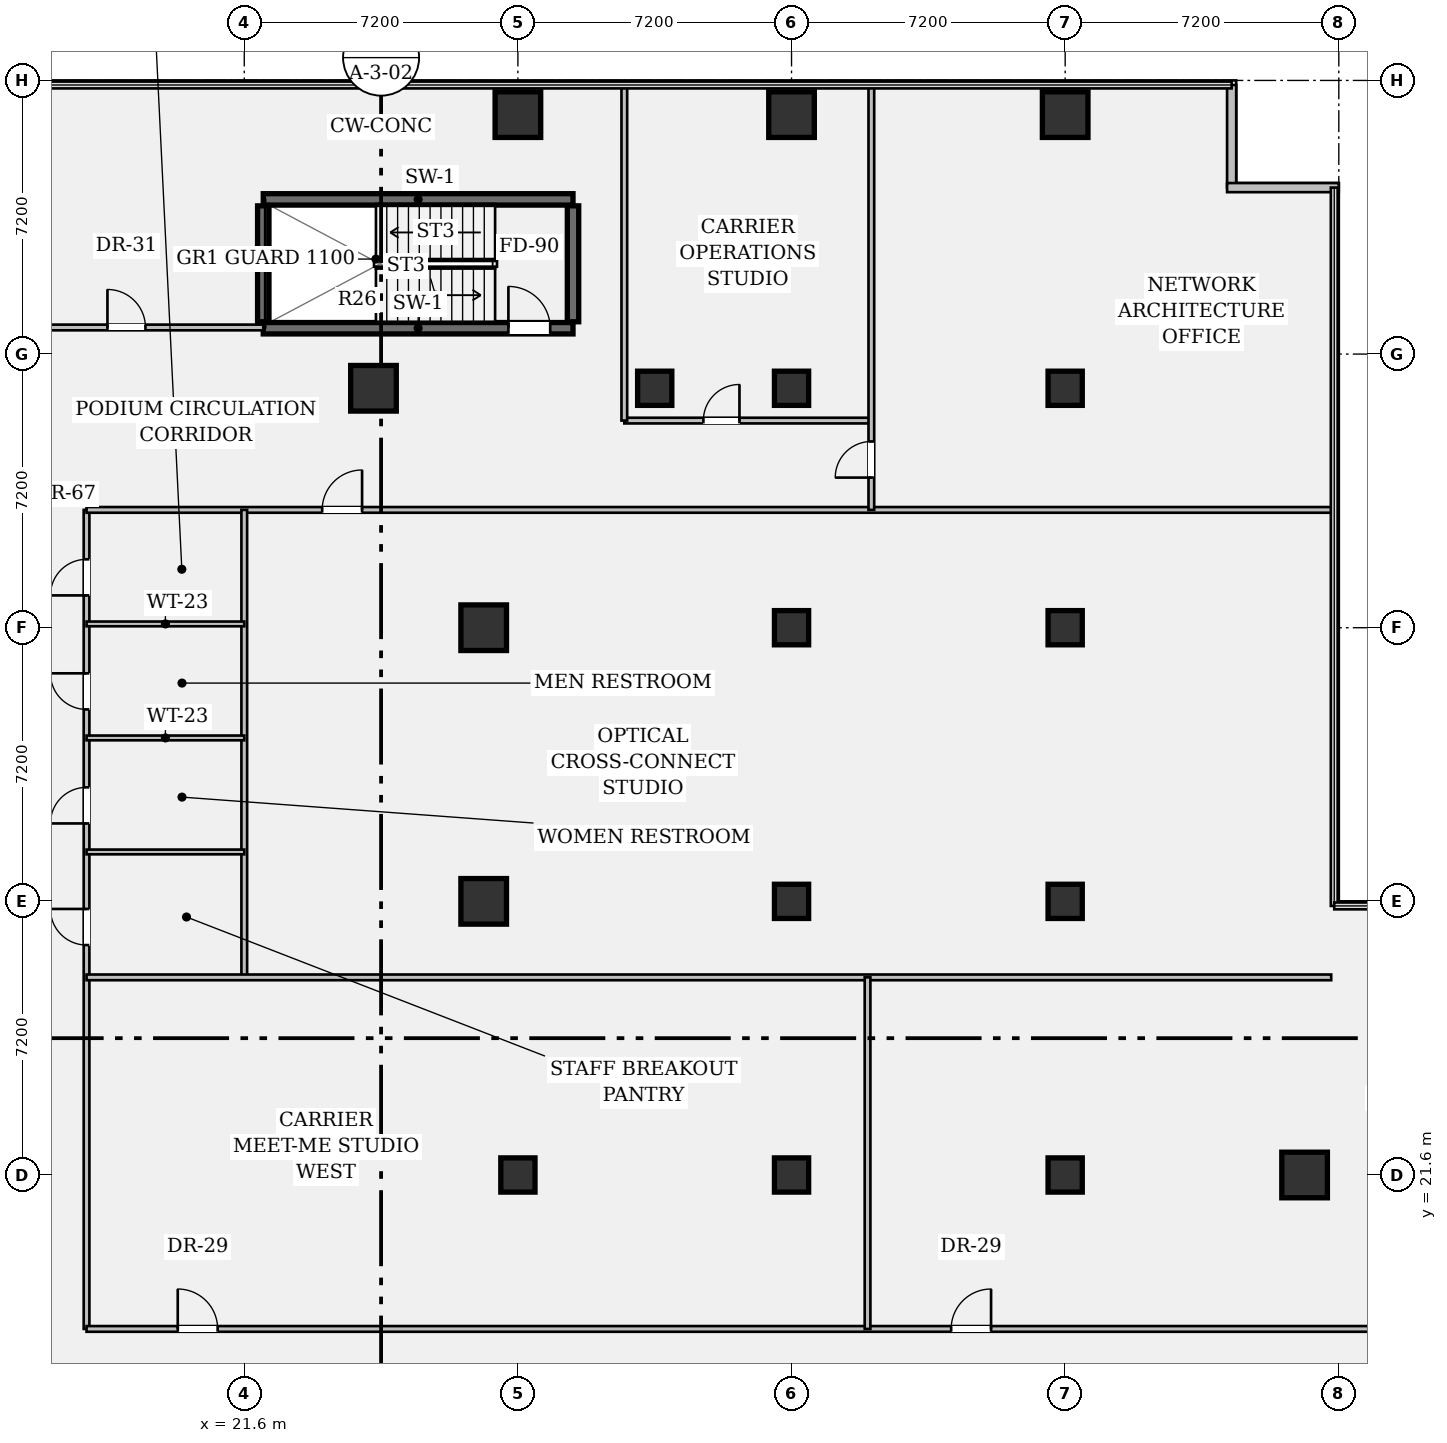
"""IFC4 building model, lengths in metres.
Left out: names, types, materials, properties, quantities, classifications, styles, units other than length and angle.
Written with IfcOpenShell. Run it as: python <this file> out.ifc"""

import sys

from ifc_helpers import new_model, si_unit, direction, frame, frame_2d, origin, origin_2d, place, context, subcontext, project, spatial, rectangle, hollow_rectangle, extrude, element, fill, save


model = new_model("IFC4")
c1 = context("Model", 3, precision=1e-05, world=origin(), true_north=direction((0.0, 1.0)))
c2 = subcontext(c1, "Body", "Model", "MODEL_VIEW")
j1 = project(units=[si_unit("LENGTHUNIT", "METRE"), si_unit("PLANEANGLEUNIT", "RADIAN")], contexts=[c1])
p1 = place(None, origin())
s1 = spatial("IfcSite", under=j1, at=p1, CompositionType="ELEMENT")
p2 = place(p1, origin())
s2 = spatial("IfcBuilding", under=s1, at=p2, CompositionType="ELEMENT")
p3 = place(p2, frame((0.0, 0.0, 5.25)))
s3 = spatial("IfcBuildingStorey", under=s2, at=p3, CompositionType="ELEMENT", Elevation=5.25)
p4 = place(p3, frame((22.1, 43.88, 0.0), z_axis=(0.0, 0.0, 1.0), x_axis=(1.0, 0.0, 0.0)))
e1 = element("IfcWall", 1, at=p4, inside=s3, PredefinedType="SHEAR", context=c2, shape_type="SweptSolid", body=[
    extrude(rectangle(XDim=8.15, YDim=0.3, at=frame_2d((4.075, 0.0))), origin(), (0.0, 0.0, 1.0), 3.9),
])
p5 = place(p4, frame((6.45, 0.0, 0.0)))
e2 = element("IfcOpeningElement", 2, at=p5, cuts=e1, PredefinedType="OPENING", context=c2, shape_type="SweptSolid", body=[
    extrude(rectangle(XDim=1.1, YDim=2.15, at=frame_2d((0.55, 1.075))), frame((0.0, 0.162, 0.0), z_axis=(0.0, -1.0, 0.0), x_axis=(1.0, 0.0, 0.0)), (0.0, 0.0, 1.0), 0.324),
])
p6 = place(p3, frame((22.1, 47.27, 0.0), z_axis=(0.0, 0.0, 1.0), x_axis=(1.0, 0.0, 0.0)))
e3 = element("IfcWall", 3, at=p6, inside=s3, PredefinedType="SHEAR", context=c2, shape_type="SweptSolid", body=[
    extrude(rectangle(XDim=8.15, YDim=0.3, at=frame_2d((4.075, 0.0))), origin(), (0.0, 0.0, 1.0), 3.9),
])
for number, where, z_axis, x_axis in (
    (4, (22.1, 44.05, 0.0), (0.0, 0.0, 1.0), (0.0, 1.0, 0.0)),
    (5, (30.25, 44.05, 0.0), (0.0, 0.0, 1.0), (0.0, 1.0, 0.0)),
):
    element("IfcWall", number, at=place(p3, frame(where, z_axis=z_axis, x_axis=x_axis)), inside=s3, PredefinedType="SHEAR", context=c2, shape_type="SweptSolid", body=[
        extrude(rectangle(XDim=3.05, YDim=0.3, at=frame_2d((1.525, 0.0))), origin(), (0.0, 0.0, 1.0), 3.9),
    ])
for number, where, z_axis, x_axis in (
    (6, (25.0, 42.3, 0.0), (0.0, 0.0, 1.0), (1.0, 0.0, 0.0)),
    (7, (27.9, 28.8, 0.0), (0.0, 0.0, 1.0), (1.0, 0.0, 0.0)),
    (8, (27.9, 36.0, 0.0), (0.0, 0.0, 1.0), (1.0, 0.0, 0.0)),
):
    element("IfcColumn", number, at=place(p3, frame(where, z_axis=z_axis, x_axis=x_axis)), inside=s3, PredefinedType="COLUMN", context=c2, shape_type="SweptSolid", body=[
        extrude(hollow_rectangle(XDim=1.2, YDim=1.2, WallThickness=0.075, at=origin_2d()), origin(), (0.0, 0.0, 1.0), 3.9),
    ])
p7 = place(p3, frame((28.8, 21.6, 0.0), z_axis=(0.0, 0.0, 1.0), x_axis=(1.0, 0.0, 0.0)))
e9 = element("IfcColumn", 9, at=p7, inside=s3, PredefinedType="COLUMN", context=c2, shape_type="SweptSolid", body=[
    extrude(rectangle(XDim=0.9, YDim=0.9, at=origin_2d()), origin(), (0.0, 0.0, 1.0), 3.9),
])
p8 = place(p3, frame((28.8, 49.5, 0.0), z_axis=(0.0, 0.0, 1.0), x_axis=(1.0, 0.0, 0.0)))
e10 = element("IfcColumn", 10, at=p8, inside=s3, PredefinedType="COLUMN", context=c2, shape_type="SweptSolid", body=[
    extrude(hollow_rectangle(XDim=1.2, YDim=1.2, WallThickness=0.075, at=origin_2d()), origin(), (0.0, 0.0, 1.0), 3.9),
])
for number, where, z_axis, x_axis in (
    (11, (32.4, 42.3, 0.0), (0.0, 0.0, 1.0), (1.0, 0.0, 0.0)),
    (12, (36.0, 21.6, 0.0), (0.0, 0.0, 1.0), (1.0, 0.0, 0.0)),
    (13, (36.0, 28.8, 0.0), (0.0, 0.0, 1.0), (1.0, 0.0, 0.0)),
    (14, (36.0, 36.0, 0.0), (0.0, 0.0, 1.0), (1.0, 0.0, 0.0)),
    (15, (36.0, 42.3, 0.0), (0.0, 0.0, 1.0), (1.0, 0.0, 0.0)),
):
    element("IfcColumn", number, at=place(p3, frame(where, z_axis=z_axis, x_axis=x_axis)), inside=s3, PredefinedType="COLUMN", context=c2, shape_type="SweptSolid", body=[
        extrude(rectangle(XDim=0.9, YDim=0.9, at=origin_2d()), origin(), (0.0, 0.0, 1.0), 3.9),
    ])
p9 = place(p3, frame((36.0, 49.5, 0.0), z_axis=(0.0, 0.0, 1.0), x_axis=(1.0, 0.0, 0.0)))
e16 = element("IfcColumn", 16, at=p9, inside=s3, PredefinedType="COLUMN", context=c2, shape_type="SweptSolid", body=[
    extrude(hollow_rectangle(XDim=1.2, YDim=1.2, WallThickness=0.075, at=origin_2d()), origin(), (0.0, 0.0, 1.0), 3.9),
])
for number, where, z_axis, x_axis in (
    (17, (43.2, 21.6, 0.0), (0.0, 0.0, 1.0), (1.0, 0.0, 0.0)),
    (18, (43.2, 28.8, 0.0), (0.0, 0.0, 1.0), (1.0, 0.0, 0.0)),
    (19, (43.2, 36.0, 0.0), (0.0, 0.0, 1.0), (1.0, 0.0, 0.0)),
    (20, (43.2, 42.3, 0.0), (0.0, 0.0, 1.0), (1.0, 0.0, 0.0)),
):
    element("IfcColumn", number, at=place(p3, frame(where, z_axis=z_axis, x_axis=x_axis)), inside=s3, PredefinedType="COLUMN", context=c2, shape_type="SweptSolid", body=[
        extrude(rectangle(XDim=0.9, YDim=0.9, at=origin_2d()), origin(), (0.0, 0.0, 1.0), 3.9),
    ])
for number, where, z_axis, x_axis in (
    (21, (43.2, 49.5, 0.0), (0.0, 0.0, 1.0), (1.0, 0.0, 0.0)),
    (22, (49.5, 21.6, 0.0), (0.0, 0.0, 1.0), (1.0, 0.0, 0.0)),
):
    element("IfcColumn", number, at=place(p3, frame(where, z_axis=z_axis, x_axis=x_axis)), inside=s3, PredefinedType="COLUMN", context=c2, shape_type="SweptSolid", body=[
        extrude(hollow_rectangle(XDim=1.2, YDim=1.2, WallThickness=0.075, at=origin_2d()), origin(), (0.0, 0.0, 1.0), 3.9),
    ])
p10 = place(p3, frame((47.58, 50.28, 0.0), z_axis=(0.0, 0.0, 1.0), x_axis=(0.0, -1.0, 0.0)))
e23 = element("IfcWall", 23, at=p10, inside=s3, PredefinedType="STANDARD", context=c2, shape_type="SweptSolid", body=[
    extrude(rectangle(XDim=2.7, YDim=0.24, at=frame_2d((1.35, 0.0))), origin(), (0.0, 0.0, 1.0), 3.9),
])
p11 = place(p3, frame((47.46, 47.58, 0.0), z_axis=(0.0, 0.0, 1.0), x_axis=(1.0, 0.0, 0.0)))
e24 = element("IfcWall", 24, at=p11, inside=s3, PredefinedType="STANDARD", context=c2, shape_type="SweptSolid", body=[
    extrude(rectangle(XDim=2.94, YDim=0.24, at=frame_2d((1.47, 0.0))), origin(), (0.0, 0.0, 1.0), 3.9),
])
p12 = place(p3, frame((17.45, 17.55, 0.0), z_axis=(0.0, 0.0, 1.0), x_axis=(0.0, 1.0, 0.0)))
e25 = element("IfcWall", 25, at=p12, inside=s3, PredefinedType="PARTITIONING", context=c2, shape_type="SweptSolid", body=[
    extrude(rectangle(XDim=21.55, YDim=0.15, at=frame_2d((10.775, 0.0))), origin(), (0.0, 0.0, 1.0), 2.938),
])
p13 = place(p12, frame((19.3, 0.0, 0.0)))
e26 = element("IfcOpeningElement", 26, at=p13, cuts=e25, PredefinedType="OPENING", context=c2, shape_type="SweptSolid", body=[
    extrude(rectangle(XDim=0.95, YDim=2.15, at=frame_2d((0.475, 1.075))), frame((0.0, 0.087, 0.0), z_axis=(0.0, -1.0, 0.0), x_axis=(1.0, 0.0, 0.0)), (0.0, 0.0, 1.0), 0.174),
])
p14 = place(p12, frame((16.3, 0.0, 0.0)))
e27 = element("IfcOpeningElement", 27, at=p14, cuts=e25, PredefinedType="OPENING", context=c2, shape_type="SweptSolid", body=[
    extrude(rectangle(XDim=0.95, YDim=2.15, at=frame_2d((0.475, 1.075))), frame((0.0, 0.087, 0.0), z_axis=(0.0, -1.0, 0.0), x_axis=(1.0, 0.0, 0.0)), (0.0, 0.0, 1.0), 0.174),
])
p15 = place(p12, frame((13.3, 0.0, 0.0)))
e28 = element("IfcOpeningElement", 28, at=p15, cuts=e25, PredefinedType="OPENING", context=c2, shape_type="SweptSolid", body=[
    extrude(rectangle(XDim=0.95, YDim=2.15, at=frame_2d((0.475, 1.075))), frame((0.0, 0.087, 0.0), z_axis=(0.0, -1.0, 0.0), x_axis=(1.0, 0.0, 0.0)), (0.0, 0.0, 1.0), 0.174),
])
p16 = place(p12, frame((10.1, 0.0, 0.0)))
e29 = element("IfcOpeningElement", 29, at=p16, cuts=e25, PredefinedType="OPENING", context=c2, shape_type="SweptSolid", body=[
    extrude(rectangle(XDim=0.95, YDim=2.15, at=frame_2d((0.475, 1.075))), frame((0.0, 0.087, 0.0), z_axis=(0.0, -1.0, 0.0), x_axis=(1.0, 0.0, 0.0)), (0.0, 0.0, 1.0), 0.174),
])
p17 = place(p3, frame((14.4, 43.9, 0.0), z_axis=(0.0, 0.0, 1.0), x_axis=(1.0, 0.0, 0.0)))
e30 = element("IfcWall", 30, at=p17, inside=s3, PredefinedType="PARTITIONING", context=c2, shape_type="SweptSolid", body=[
    extrude(rectangle(XDim=7.7, YDim=0.15, at=frame_2d((3.85, 0.0))), origin(), (0.0, 0.0, 1.0), 2.938),
])
p18 = place(p17, frame((3.6, 0.0, 0.0)))
e31 = element("IfcOpeningElement", 31, at=p18, cuts=e30, PredefinedType="OPENING", context=c2, shape_type="SweptSolid", body=[
    extrude(rectangle(XDim=1.0, YDim=2.15, at=frame_2d((0.5, 1.075))), frame((0.0, 0.087, 0.0), z_axis=(0.0, -1.0, 0.0), x_axis=(1.0, 0.0, 0.0)), (0.0, 0.0, 1.0), 0.174),
])
p19 = place(p3, frame((31.6, 41.45, 0.0), z_axis=(0.0, 0.0, 1.0), x_axis=(1.0, 0.0, 0.0)))
e32 = element("IfcWall", 32, at=p19, inside=s3, PredefinedType="PARTITIONING", context=c2, shape_type="SweptSolid", body=[
    extrude(rectangle(XDim=6.5, YDim=0.15, at=frame_2d((3.25, 0.0))), origin(), (0.0, 0.0, 1.0), 2.938),
])
p20 = place(p19, frame((2.08, 0.0, 0.0)))
e33 = element("IfcOpeningElement", 33, at=p20, cuts=e32, PredefinedType="OPENING", context=c2, shape_type="SweptSolid", body=[
    extrude(rectangle(XDim=0.95, YDim=2.15, at=frame_2d((0.475, 1.075))), frame((0.0, 0.087, 0.0), z_axis=(0.0, -1.0, 0.0), x_axis=(1.0, 0.0, 0.0)), (0.0, 0.0, 1.0), 0.174),
])
p21 = place(p3, frame((17.45, 39.1, 0.0), z_axis=(0.0, 0.0, 1.0), x_axis=(1.0, 0.0, 0.0)))
e34 = element("IfcWall", 34, at=p21, inside=s3, PredefinedType="PARTITIONING", context=c2, shape_type="SweptSolid", body=[
    extrude(rectangle(XDim=32.83, YDim=0.15, at=frame_2d((16.415, 0.0))), origin(), (0.0, 0.0, 1.0), 2.938),
])
p22 = place(p21, frame((6.2, 0.0, 0.0)))
e35 = element("IfcOpeningElement", 35, at=p22, cuts=e34, PredefinedType="OPENING", context=c2, shape_type="SweptSolid", body=[
    extrude(rectangle(XDim=1.05, YDim=2.15, at=frame_2d((0.525, 1.075))), frame((0.0, 0.087, 0.0), z_axis=(0.0, -1.0, 0.0), x_axis=(1.0, 0.0, 0.0)), (0.0, 0.0, 1.0), 0.174),
])
p23 = place(p3, frame((31.6, 41.45, 0.0), z_axis=(0.0, 0.0, 1.0), x_axis=(0.0, 1.0, 0.0)))
e36 = element("IfcWall", 36, at=p23, inside=s3, PredefinedType="PARTITIONING", context=c2, shape_type="SweptSolid", body=[
    extrude(rectangle(XDim=8.83, YDim=0.15, at=frame_2d((4.415, 0.0))), origin(), (0.0, 0.0, 1.0), 2.938),
])
p24 = place(p3, frame((38.1, 39.1, 0.0), z_axis=(0.0, 0.0, 1.0), x_axis=(0.0, 1.0, 0.0)))
e37 = element("IfcWall", 37, at=p24, inside=s3, PredefinedType="PARTITIONING", context=c2, shape_type="SweptSolid", body=[
    extrude(rectangle(XDim=11.18, YDim=0.15, at=frame_2d((5.59, 0.0))), origin(), (0.0, 0.0, 1.0), 2.938),
])
p25 = place(p24, frame((0.85, 0.0, 0.0)))
e38 = element("IfcOpeningElement", 38, at=p25, cuts=e37, PredefinedType="OPENING", context=c2, shape_type="SweptSolid", body=[
    extrude(rectangle(XDim=0.95, YDim=2.15, at=frame_2d((0.475, 1.075))), frame((0.0, 0.087, 0.0), z_axis=(0.0, -1.0, 0.0), x_axis=(1.0, 0.0, 0.0)), (0.0, 0.0, 1.0), 0.174),
])
p26 = place(p3, frame((17.45, 17.55, 0.0), z_axis=(0.0, 0.0, 1.0), x_axis=(1.0, 0.0, 0.0)))
e39 = element("IfcWall", 39, at=p26, inside=s3, PredefinedType="PARTITIONING", context=c2, shape_type="SweptSolid", body=[
    extrude(rectangle(XDim=68.83, YDim=0.15, at=frame_2d((34.415, 0.0))), origin(), (0.0, 0.0, 1.0), 2.938),
])
p27 = place(p26, frame((2.4, 0.0, 0.0)))
e40 = element("IfcOpeningElement", 40, at=p27, cuts=e39, PredefinedType="OPENING", context=c2, shape_type="SweptSolid", body=[
    extrude(rectangle(XDim=1.05, YDim=2.15, at=frame_2d((0.525, 1.075))), frame((0.0, 0.087, 0.0), z_axis=(0.0, -1.0, 0.0), x_axis=(1.0, 0.0, 0.0)), (0.0, 0.0, 1.0), 0.174),
])
p28 = place(p26, frame((22.75, 0.0, 0.0)))
e41 = element("IfcOpeningElement", 41, at=p28, cuts=e39, PredefinedType="OPENING", context=c2, shape_type="SweptSolid", body=[
    extrude(rectangle(XDim=1.05, YDim=2.15, at=frame_2d((0.525, 1.075))), frame((0.0, 0.087, 0.0), z_axis=(0.0, -1.0, 0.0), x_axis=(1.0, 0.0, 0.0)), (0.0, 0.0, 1.0), 0.174),
])
p29 = place(p26, frame((46.75, 0.0, 0.0)))
e42 = element("IfcOpeningElement", 42, at=p29, cuts=e39, PredefinedType="OPENING", context=c2, shape_type="SweptSolid", body=[
    extrude(rectangle(XDim=1.05, YDim=2.15, at=frame_2d((0.525, 1.075))), frame((0.0, 0.087, 0.0), z_axis=(0.0, -1.0, 0.0), x_axis=(1.0, 0.0, 0.0)), (0.0, 0.0, 1.0), 0.174),
])
p30 = place(p3, frame((21.6, 26.8, 0.0), z_axis=(0.0, 0.0, 1.0), x_axis=(0.0, 1.0, 0.0)))
e43 = element("IfcWall", 43, at=p30, inside=s3, PredefinedType="PARTITIONING", context=c2, shape_type="SweptSolid", body=[
    extrude(rectangle(XDim=12.3, YDim=0.15, at=frame_2d((6.15, 0.0))), origin(), (0.0, 0.0, 1.0), 2.938),
])
p31 = place(p3, frame((17.45, 36.1, 0.0), z_axis=(0.0, 0.0, 1.0), x_axis=(1.0, 0.0, 0.0)))
e44 = element("IfcWall", 44, at=p31, inside=s3, PredefinedType="PARTITIONING", context=c2, shape_type="SweptSolid", body=[
    extrude(rectangle(XDim=4.15, YDim=0.125, at=frame_2d((2.075, 0.0))), origin(), (0.0, 0.0, 1.0), 2.938),
])
for number, where, z_axis, x_axis in (
    (45, (17.45, 33.1, 0.0), (0.0, 0.0, 1.0), (1.0, 0.0, 0.0)),
    (46, (17.45, 30.1, 0.0), (0.0, 0.0, 1.0), (1.0, 0.0, 0.0)),
):
    element("IfcWall", number, at=place(p3, frame(where, z_axis=z_axis, x_axis=x_axis)), inside=s3, PredefinedType="PARTITIONING", context=c2, shape_type="SweptSolid", body=[
        extrude(rectangle(XDim=4.15, YDim=0.125, at=frame_2d((2.075, 0.0))), origin(), (0.0, 0.0, 1.0), 3.336),
    ])
p32 = place(p3, frame((17.45, 26.8, 0.0), z_axis=(0.0, 0.0, 1.0), x_axis=(1.0, 0.0, 0.0)))
e47 = element("IfcWall", 47, at=p32, inside=s3, PredefinedType="PARTITIONING", context=c2, shape_type="SweptSolid", body=[
    extrude(rectangle(XDim=32.75, YDim=0.15, at=frame_2d((16.375, 0.0))), origin(), (0.0, 0.0, 1.0), 2.938),
])
p33 = place(p3, frame((38.0, 17.55, 0.0), z_axis=(0.0, 0.0, 1.0), x_axis=(0.0, 1.0, 0.0)))
e48 = element("IfcWall", 48, at=p33, inside=s3, PredefinedType="PARTITIONING", context=c2, shape_type="SweptSolid", body=[
    extrude(rectangle(XDim=9.25, YDim=0.15, at=frame_2d((4.625, 0.0))), origin(), (0.0, 0.0, 1.0), 2.938),
])
p34 = place(p5, origin())
e49 = element("IfcDoor", 49, at=p34, inside=s3, OperationType="SINGLE_SWING_LEFT", PredefinedType="DOOR", context=c2, shape_type="SweptSolid", body=[
    extrude(rectangle(XDim=1.1, YDim=2.15, at=frame_2d((0.55, 1.075))), frame((0.0, 0.025, 0.0), z_axis=(0.0, -1.0, 0.0), x_axis=(1.0, 0.0, 0.0)), (0.0, 0.0, 1.0), 0.05),
])
fill(e2, e49)
p35 = place(p13, origin())
e50 = element("IfcDoor", 50, at=p35, inside=s3, OperationType="SINGLE_SWING_LEFT", PredefinedType="DOOR", context=c2, shape_type="SweptSolid", body=[
    extrude(rectangle(XDim=0.95, YDim=2.15, at=frame_2d((0.475, 1.075))), frame((0.0, 0.025, 0.0), z_axis=(0.0, -1.0, 0.0), x_axis=(1.0, 0.0, 0.0)), (0.0, 0.0, 1.0), 0.05),
])
fill(e26, e50)
p36 = place(p14, origin())
e51 = element("IfcDoor", 51, at=p36, inside=s3, OperationType="SINGLE_SWING_RIGHT", PredefinedType="DOOR", context=c2, shape_type="SweptSolid", body=[
    extrude(rectangle(XDim=0.95, YDim=2.15, at=frame_2d((0.475, 1.075))), frame((0.0, 0.025, 0.0), z_axis=(0.0, -1.0, 0.0), x_axis=(1.0, 0.0, 0.0)), (0.0, 0.0, 1.0), 0.05),
])
fill(e27, e51)
p37 = place(p15, origin())
e52 = element("IfcDoor", 52, at=p37, inside=s3, OperationType="SINGLE_SWING_LEFT", PredefinedType="DOOR", context=c2, shape_type="SweptSolid", body=[
    extrude(rectangle(XDim=0.95, YDim=2.15, at=frame_2d((0.475, 1.075))), frame((0.0, 0.025, 0.0), z_axis=(0.0, -1.0, 0.0), x_axis=(1.0, 0.0, 0.0)), (0.0, 0.0, 1.0), 0.05),
])
fill(e28, e52)
p38 = place(p16, origin())
e53 = element("IfcDoor", 53, at=p38, inside=s3, OperationType="SINGLE_SWING_RIGHT", PredefinedType="DOOR", context=c2, shape_type="SweptSolid", body=[
    extrude(rectangle(XDim=0.95, YDim=2.15, at=frame_2d((0.475, 1.075))), frame((0.0, 0.025, 0.0), z_axis=(0.0, -1.0, 0.0), x_axis=(1.0, 0.0, 0.0)), (0.0, 0.0, 1.0), 0.05),
])
fill(e29, e53)
p39 = place(p20, origin())
e54 = element("IfcDoor", 54, at=p39, inside=s3, OperationType="SINGLE_SWING_RIGHT", PredefinedType="DOOR", context=c2, shape_type="SweptSolid", body=[
    extrude(rectangle(XDim=0.95, YDim=2.15, at=frame_2d((0.475, 1.075))), frame((0.0, 0.025, 0.0), z_axis=(0.0, -1.0, 0.0), x_axis=(1.0, 0.0, 0.0)), (0.0, 0.0, 1.0), 0.05),
])
fill(e33, e54)
p40 = place(p27, origin())
e55 = element("IfcDoor", 55, at=p40, inside=s3, OperationType="SINGLE_SWING_LEFT", PredefinedType="DOOR", context=c2, shape_type="SweptSolid", body=[
    extrude(rectangle(XDim=1.05, YDim=2.15, at=frame_2d((0.525, 1.075))), frame((0.0, 0.025, 0.0), z_axis=(0.0, -1.0, 0.0), x_axis=(1.0, 0.0, 0.0)), (0.0, 0.0, 1.0), 0.05),
])
fill(e40, e55)
p41 = place(p28, origin())
e56 = element("IfcDoor", 56, at=p41, inside=s3, OperationType="SINGLE_SWING_RIGHT", PredefinedType="DOOR", context=c2, shape_type="SweptSolid", body=[
    extrude(rectangle(XDim=1.05, YDim=2.15, at=frame_2d((0.525, 1.075))), frame((0.0, 0.025, 0.0), z_axis=(0.0, -1.0, 0.0), x_axis=(1.0, 0.0, 0.0)), (0.0, 0.0, 1.0), 0.05),
])
fill(e41, e56)
p42 = place(p22, origin())
e57 = element("IfcDoor", 57, at=p42, inside=s3, OperationType="SINGLE_SWING_RIGHT", PredefinedType="DOOR", context=c2, shape_type="SweptSolid", body=[
    extrude(rectangle(XDim=1.05, YDim=2.15, at=frame_2d((0.525, 1.075))), frame((0.0, 0.025, 0.0), z_axis=(0.0, -1.0, 0.0), x_axis=(1.0, 0.0, 0.0)), (0.0, 0.0, 1.0), 0.05),
])
fill(e35, e57)
p43 = place(p25, origin())
e58 = element("IfcDoor", 58, at=p43, inside=s3, OperationType="SINGLE_SWING_LEFT", PredefinedType="DOOR", context=c2, shape_type="SweptSolid", body=[
    extrude(rectangle(XDim=0.95, YDim=2.15, at=frame_2d((0.475, 1.075))), frame((0.0, 0.025, 0.0), z_axis=(0.0, -1.0, 0.0), x_axis=(1.0, 0.0, 0.0)), (0.0, 0.0, 1.0), 0.05),
])
fill(e38, e58)
p44 = place(p18, origin())
e59 = element("IfcDoor", 59, at=p44, inside=s3, OperationType="SINGLE_SWING_LEFT", PredefinedType="DOOR", context=c2, shape_type="SweptSolid", body=[
    extrude(rectangle(XDim=1.0, YDim=2.15, at=frame_2d((0.5, 1.075))), frame((0.0, 0.025, 0.0), z_axis=(0.0, -1.0, 0.0), x_axis=(1.0, 0.0, 0.0)), (0.0, 0.0, 1.0), 0.05),
])
fill(e31, e59)
save(model, sys.argv[1])
